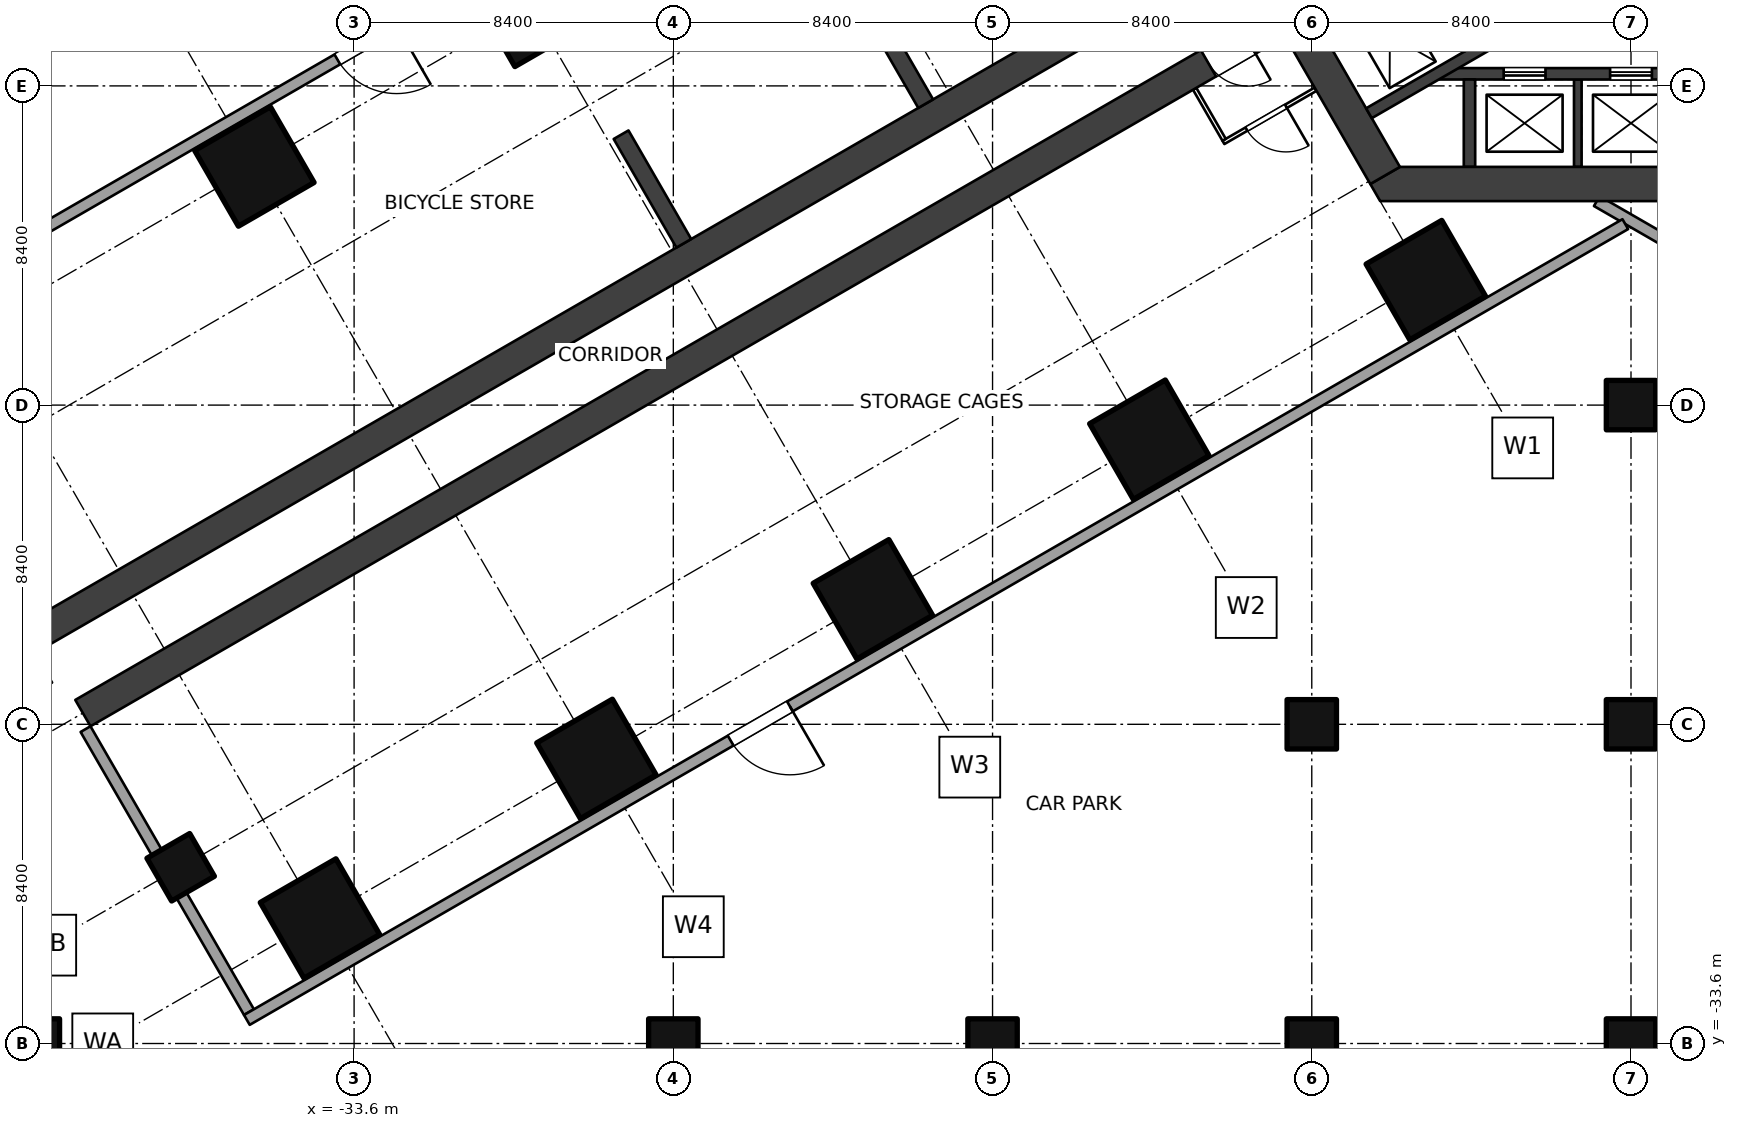
"""IFC4 building model, lengths in metres.
Left out: names, types, materials, properties, quantities, classifications, styles, units other than length and angle.
Written with IfcOpenShell. Run it as: python <this file> out.ifc"""

import sys

from ifc_helpers import new_model, si_unit, direction, frame, frame_2d, origin, origin_2d, place, context, subcontext, project, spatial, polyline, rectangle, outline, extrude, element, fill, save


model = new_model("IFC4")
c1 = context("Model", 3, precision=1e-05, world=origin(), true_north=direction((0.0, 1.0)))
c2 = subcontext(c1, "Body", "Model", "MODEL_VIEW")
j1 = project(units=[si_unit("LENGTHUNIT", "METRE"), si_unit("PLANEANGLEUNIT", "RADIAN")], contexts=[c1])
p1 = place(None, origin())
s1 = spatial("IfcSite", under=j1, at=p1, CompositionType="ELEMENT")
p2 = place(p1, origin())
s2 = spatial("IfcBuilding", under=s1, at=p2, CompositionType="ELEMENT")
p3 = place(p2, frame((0.0, 0.0, -7.0)))
s3 = spatial("IfcBuildingStorey", under=s2, at=p3, CompositionType="ELEMENT", Elevation=-7.0)
for number, where, z_axis, x_axis in (
    (1, (-5.4, -13.51, 0.0), (0.0, 0.0, 1.0), (-0.5, 0.866, 0.0)),
    (2, (-12.675, -17.71, 0.0), (0.0, 0.0, 1.0), (-0.5, 0.866, 0.0)),
    (3, (-19.949, -21.91, 0.0), (0.0, 0.0, 1.0), (-0.5, 0.866, 0.0)),
    (4, (-28.949, -6.322, 0.0), (0.0, 0.0, 1.0), (-0.5, 0.866, 0.0)),
    (5, (-27.224, -26.11, 0.0), (0.0, 0.0, 1.0), (-0.5, 0.866, 0.0)),
    (6, (-36.224, -10.521, 0.0), (0.0, 0.0, 1.0), (-0.5, 0.866, 0.0)),
    (7, (-34.499, -30.31, 0.0), (0.0, 0.0, 1.0), (-0.5, 0.866, 0.0)),
):
    element("IfcColumn", number, at=place(p3, frame(where, z_axis=z_axis, x_axis=x_axis)), inside=s3, PredefinedType="COLUMN", context=c2, shape_type="SweptSolid", body=[
        extrude(rectangle(XDim=2.3, YDim=2.3, at=origin_2d()), origin(), (0.0, 0.0, 1.0), 3.5),
    ])
for number, where, z_axis, x_axis in (
    (8, (-38.164, -28.962, 0.0), (0.0, 0.0, 1.0), (-0.5, 0.866, 0.0)),
    (9, (-42.0, -33.6, 0.0), (0.0, 0.0, 1.0), (1.0, 0.0, 0.0)),
    (10, (-25.2, -33.6, 0.0), (0.0, 0.0, 1.0), (1.0, 0.0, 0.0)),
    (11, (-16.8, -33.6, 0.0), (0.0, 0.0, 1.0), (1.0, 0.0, 0.0)),
    (12, (-8.4, -33.6, 0.0), (0.0, 0.0, 1.0), (1.0, 0.0, 0.0)),
    (13, (-8.4, -25.2, 0.0), (0.0, 0.0, 1.0), (1.0, 0.0, 0.0)),
    (14, (0.0, -33.6, 0.0), (0.0, 0.0, 1.0), (1.0, 0.0, 0.0)),
    (15, (0.0, -25.2, 0.0), (0.0, 0.0, 1.0), (1.0, 0.0, 0.0)),
    (16, (0.0, -16.8, 0.0), (0.0, 0.0, 1.0), (1.0, 0.0, 0.0)),
):
    element("IfcColumn", number, at=place(p3, frame(where, z_axis=z_axis, x_axis=x_axis)), inside=s3, PredefinedType="COLUMN", context=c2, shape_type="SweptSolid", body=[
        extrude(rectangle(XDim=1.3, YDim=1.3, at=origin_2d()), origin(), (0.0, 0.0, 1.0), 3.5),
    ])
p4 = place(p3, frame((-6.47, -10.757, 0.0), z_axis=(0.0, 0.0, 1.0), x_axis=(-0.499997612506, 0.8660267822, 0.0)))
e17 = element("IfcWall", 17, at=p4, inside=s3, PredefinedType="SHEAR", context=c2, shape_type="SweptSolid", body=[
    extrude(rectangle(XDim=12.161, YDim=0.9, at=frame_2d((6.08, 0.0))), origin(), (0.0, 0.0, 1.0), 3.5),
])
p5 = place(p4, frame((5.33, 0.0, 0.0)))
e18 = element("IfcOpeningElement", 18, at=p5, cuts=e17, PredefinedType="OPENING", context=c2, shape_type="SweptSolid", body=[
    extrude(rectangle(XDim=1.5, YDim=2.1, at=frame_2d((0.75, 1.05))), frame((0.0, 0.46, 0.0), z_axis=(0.0, -1.0, 0.0), x_axis=(1.0, 0.0, 0.0)), (0.0, 0.0, 1.0), 0.92),
])
p6 = place(p3, origin())
e19 = element("IfcWall", 19, at=p6, inside=s3, PredefinedType="SHEAR", context=c2, shape_type="SweptSolid", body=[
    extrude(outline(polyline([(-6.6, -11.432), (6.6, -11.432), (6.86, -10.981), (6.08, -10.531), (-6.08, -10.531), (-6.86, -10.981), (-6.6, -11.432)])), origin(), (0.0, 0.0, 1.0), 3.5),
])
p7 = place(p3, frame((-0.919, -5.669, 0.0), z_axis=(0.0, 0.0, 1.0), x_axis=(-0.866011800373, -0.500023561059, 0.0)))
e20 = element("IfcWall", 20, at=p7, inside=s3, PredefinedType="SHEAR", context=c2, shape_type="SweptSolid", body=[
    extrude(rectangle(XDim=6.902, YDim=0.3, at=frame_2d((3.451, 0.0))), origin(), (0.0, 0.0, 1.0), 3.5),
])
p8 = place(p3, frame((5.098, -8.082, 0.0), z_axis=(0.0, 0.0, 1.0), x_axis=(-1.0, 0.0, 0.0)))
e21 = element("IfcWall", 21, at=p8, inside=s3, PredefinedType="SHEAR", context=c2, shape_type="SweptSolid", body=[
    extrude(rectangle(XDim=10.195, YDim=0.3, at=frame_2d((5.098, 0.0))), origin(), (0.0, 0.0, 1.0), 3.5),
])
p9 = place(p8, frame((1.748, 0.0, 0.0)))
e22 = element("IfcOpeningElement", 22, at=p9, cuts=e21, PredefinedType="OPENING", context=c2, shape_type="SweptSolid", body=[
    extrude(rectangle(XDim=1.1, YDim=2.1, at=frame_2d((0.55, 1.05))), frame((0.0, 0.16, 0.0), z_axis=(0.0, -1.0, 0.0), x_axis=(1.0, 0.0, 0.0)), (0.0, 0.0, 1.0), 0.32),
])
p10 = place(p8, frame((4.548, 0.0, 0.0)))
e23 = element("IfcOpeningElement", 23, at=p10, cuts=e21, PredefinedType="OPENING", context=c2, shape_type="SweptSolid", body=[
    extrude(rectangle(XDim=1.1, YDim=2.1, at=frame_2d((0.55, 1.05))), frame((0.0, 0.16, 0.0), z_axis=(0.0, -1.0, 0.0), x_axis=(1.0, 0.0, 0.0)), (0.0, 0.0, 1.0), 0.32),
])
p11 = place(p8, frame((7.348, 0.0, 0.0)))
e24 = element("IfcOpeningElement", 24, at=p11, cuts=e21, PredefinedType="OPENING", context=c2, shape_type="SweptSolid", body=[
    extrude(rectangle(XDim=1.1, YDim=2.1, at=frame_2d((0.55, 1.05))), frame((0.0, 0.16, 0.0), z_axis=(0.0, -1.0, 0.0), x_axis=(1.0, 0.0, 0.0)), (0.0, 0.0, 1.0), 0.32),
])
p12 = place(p3, frame((-4.25, -8.231, 0.0), z_axis=(0.0, 0.0, 1.0), x_axis=(0.0, -1.0, 0.0)))
e25 = element("IfcWall", 25, at=p12, inside=s3, PredefinedType="SHEAR", context=c2, shape_type="SweptSolid", body=[
    extrude(rectangle(XDim=2.3, YDim=0.3, at=frame_2d((1.15, 0.0))), origin(), (0.0, 0.0, 1.0), 3.5),
])
p13 = place(p3, frame((-1.4, -8.231, 0.0), z_axis=(0.0, 0.0, 1.0), x_axis=(0.0, -1.0, 0.0)))
e26 = element("IfcWall", 26, at=p13, inside=s3, PredefinedType="SHEAR", context=c2, shape_type="SweptSolid", body=[
    extrude(rectangle(XDim=2.3, YDim=0.2, at=frame_2d((1.15, 0.0))), origin(), (0.0, 0.0, 1.0), 3.5),
])
p14 = place(p3, frame((-8.91, -6.53, 0.0), z_axis=(0.0, 0.0, 1.0), x_axis=(-0.866025284237, -0.500000207062, 0.0)))
e27 = element("IfcWall", 27, at=p14, inside=s3, PredefinedType="SHEAR", context=c2, shape_type="SweptSolid", body=[
    extrude(rectangle(XDim=36.75, YDim=0.8, at=frame_2d((18.375, 0.0))), origin(), (0.0, 0.0, 1.0), 3.5),
])
p15 = place(p14, frame((1.35, 0.0, 0.0)))
e28 = element("IfcOpeningElement", 28, at=p15, cuts=e27, PredefinedType="OPENING", context=c2, shape_type="SweptSolid", body=[
    extrude(rectangle(XDim=1.2, YDim=2.1, at=frame_2d((0.6, 1.05))), frame((0.0, 0.41, 0.0), z_axis=(0.0, -1.0, 0.0), x_axis=(1.0, 0.0, 0.0)), (0.0, 0.0, 1.0), 0.82),
])
p16 = place(p3, frame((-10.11, -4.451, 0.0), z_axis=(0.0, 0.0, 1.0), x_axis=(-0.866025284237, -0.500000207062, 0.0)))
e29 = element("IfcWall", 29, at=p16, inside=s3, PredefinedType="SHEAR", context=c2, shape_type="SweptSolid", body=[
    extrude(rectangle(XDim=36.75, YDim=0.8, at=frame_2d((18.375, 0.0))), origin(), (0.0, 0.0, 1.0), 3.5),
])
p17 = place(p16, frame((1.35, 0.0, 0.0)))
e30 = element("IfcOpeningElement", 30, at=p17, cuts=e29, PredefinedType="OPENING", context=c2, shape_type="SweptSolid", body=[
    extrude(rectangle(XDim=1.2, YDim=2.1, at=frame_2d((0.6, 1.05))), frame((0.0, 0.41, 0.0), z_axis=(0.0, -1.0, 0.0), x_axis=(1.0, 0.0, 0.0)), (0.0, 0.0, 1.0), 0.82),
])
p18 = place(p3, frame((-8.3, -8.487, 0.0), z_axis=(0.0, 0.0, 1.0), x_axis=(-0.866034573852, -0.49998411664, 0.0)))
e31 = element("IfcWall", 31, at=p18, inside=s3, PredefinedType="PARTITIONING", context=c2, shape_type="SweptSolid", body=[
    extrude(rectangle(XDim=2.8, YDim=0.1, at=frame_2d((1.4, 0.0))), origin(), (0.0, 0.0, 1.0), 3.2),
])
p19 = place(p18, frame((0.9, 0.0, 0.0)))
e32 = element("IfcOpeningElement", 32, at=p19, cuts=e31, PredefinedType="OPENING", context=c2, shape_type="SweptSolid", body=[
    extrude(rectangle(XDim=1.2, YDim=2.1, at=frame_2d((0.6, 1.05))), frame((0.0, 0.06, 0.0), z_axis=(0.0, -1.0, 0.0), x_axis=(1.0, 0.0, 0.0)), (0.0, 0.0, 1.0), 0.12),
])
p20 = place(p3, frame((-11.482, -8.476, 0.0), z_axis=(0.0, 0.0, 1.0), x_axis=(0.500017819788, -0.86601511528, 0.0)))
e33 = element("IfcWall", 33, at=p20, inside=s3, PredefinedType="PARTITIONING", context=c2, shape_type="SweptSolid", body=[
    extrude(rectangle(XDim=1.55, YDim=0.1, at=frame_2d((0.775, 0.0))), origin(), (0.0, 0.0, 1.0), 3.2),
])
p21 = place(p3, frame((-40.667, -25.326, 0.0), z_axis=(0.0, 0.0, 1.0), x_axis=(0.500007509209, -0.866021068297, 0.0)))
e34 = element("IfcWall", 34, at=p21, inside=s3, PredefinedType="SOLIDWALL", context=c2, shape_type="SweptSolid", body=[
    extrude(rectangle(XDim=8.6, YDim=0.3, at=frame_2d((4.3, 0.0))), origin(), (0.0, 0.0, 1.0), 1.9),
])
p22 = place(p3, frame((-0.15, -12.038, 0.0), z_axis=(0.0, 0.0, 1.0), x_axis=(-0.866026292622, -0.499998460486, 0.0)))
e35 = element("IfcWall", 35, at=p22, inside=s3, PredefinedType="SOLIDWALL", context=c2, shape_type="SweptSolid", body=[
    extrude(rectangle(XDim=41.883, YDim=0.3, at=frame_2d((20.941, 0.0))), origin(), (0.0, 0.0, 1.0), 3.2),
])
p23 = place(p22, frame((25.383, 0.0, 0.0)))
e36 = element("IfcOpeningElement", 36, at=p23, cuts=e35, PredefinedType="OPENING", context=c2, shape_type="SweptSolid", body=[
    extrude(rectangle(XDim=1.8, YDim=2.4, at=frame_2d((0.9, 1.2))), frame((0.0, 0.16, 0.0), z_axis=(0.0, -1.0, 0.0), x_axis=(1.0, 0.0, 0.0)), (0.0, 0.0, 1.0), 0.32),
])
p24 = place(p3, frame((-9.45, 6.495, 0.0), z_axis=(0.0, 0.0, 1.0), x_axis=(-0.866025301493, -0.500000177174, 0.0)))
e37 = element("IfcWall", 37, at=p24, inside=s3, PredefinedType="SOLIDWALL", context=c2, shape_type="SweptSolid", body=[
    extrude(rectangle(XDim=43.095, YDim=0.3, at=frame_2d((21.548, 0.0))), origin(), (0.0, 0.0, 1.0), 3.2),
])
p25 = place(p24, frame((26.595, 0.0, 0.0)))
e38 = element("IfcOpeningElement", 38, at=p25, cuts=e37, PredefinedType="OPENING", context=c2, shape_type="SweptSolid", body=[
    extrude(rectangle(XDim=1.8, YDim=2.4, at=frame_2d((0.9, 1.2))), frame((0.0, 0.16, 0.0), z_axis=(0.0, -1.0, 0.0), x_axis=(1.0, 0.0, 0.0)), (0.0, 0.0, 1.0), 0.32),
])
p26 = place(p3, frame((-0.9, -11.432, 0.0), z_axis=(0.0, 0.0, 1.0), x_axis=(0.866025301493, -0.500000177174, 0.0)))
e39 = element("IfcWall", 39, at=p26, inside=s3, PredefinedType="SOLIDWALL", context=c2, shape_type="SweptSolid", body=[
    extrude(rectangle(XDim=43.095, YDim=0.3, at=frame_2d((21.548, 0.0))), origin(), (0.0, 0.0, 1.0), 3.2),
])
p27 = place(p26, frame((26.595, 0.0, 0.0)))
e40 = element("IfcOpeningElement", 40, at=p27, cuts=e39, PredefinedType="OPENING", context=c2, shape_type="SweptSolid", body=[
    extrude(rectangle(XDim=1.8, YDim=2.4, at=frame_2d((0.9, 1.2))), frame((0.0, 0.16, 0.0), z_axis=(0.0, -1.0, 0.0), x_axis=(1.0, 0.0, 0.0)), (0.0, 0.0, 1.0), 0.32),
])
for number, where, z_axis, x_axis in (
    (41, (-18.559, -8.868, 0.0), (0.0, 0.0, 1.0), (-0.5, 0.866, 0.0)),
    (42, (-24.925, -12.543, 0.0), (0.0, 0.0, 1.0), (-0.5, 0.866, 0.0)),
):
    element("IfcWall", number, at=place(p3, frame(where, z_axis=z_axis, x_axis=x_axis)), inside=s3, PredefinedType="SOLIDWALL", context=c2, shape_type="SweptSolid", body=[
        extrude(rectangle(XDim=3.3, YDim=0.45, at=frame_2d((1.65, 0.0))), origin(), (0.0, 0.0, 1.0), 3.5),
    ])
p28 = place(p10, origin())
e43 = element("IfcDoor", 43, at=p28, inside=s3, OperationType="DOUBLE_DOOR_SLIDING", PredefinedType="DOOR", context=c2, shape_type="SweptSolid", body=[
    extrude(rectangle(XDim=1.1, YDim=2.1, at=frame_2d((0.55, 1.05))), frame((0.0, 0.025, 0.0), z_axis=(0.0, -1.0, 0.0), x_axis=(1.0, 0.0, 0.0)), (0.0, 0.0, 1.0), 0.05),
])
fill(e23, e43)
p29 = place(p11, origin())
e44 = element("IfcDoor", 44, at=p29, inside=s3, OperationType="DOUBLE_DOOR_SLIDING", PredefinedType="DOOR", context=c2, shape_type="SweptSolid", body=[
    extrude(rectangle(XDim=1.1, YDim=2.1, at=frame_2d((0.55, 1.05))), frame((0.0, 0.025, 0.0), z_axis=(0.0, -1.0, 0.0), x_axis=(1.0, 0.0, 0.0)), (0.0, 0.0, 1.0), 0.05),
])
fill(e24, e44)
p30 = place(p15, origin())
e45 = element("IfcDoor", 45, at=p30, inside=s3, OperationType="DOUBLE_SWING_LEFT", PredefinedType="DOOR", context=c2, shape_type="SweptSolid", body=[
    extrude(rectangle(XDim=1.2, YDim=2.1, at=frame_2d((0.6, 1.05))), frame((0.0, 0.025, 0.0), z_axis=(0.0, -1.0, 0.0), x_axis=(1.0, 0.0, 0.0)), (0.0, 0.0, 1.0), 0.05),
])
fill(e28, e45)
p31 = place(p19, origin())
e46 = element("IfcDoor", 46, at=p31, inside=s3, OperationType="DOUBLE_SWING_LEFT", PredefinedType="DOOR", context=c2, shape_type="SweptSolid", body=[
    extrude(rectangle(XDim=1.2, YDim=2.1, at=frame_2d((0.6, 1.05))), frame((0.0, 0.025, 0.0), z_axis=(0.0, -1.0, 0.0), x_axis=(1.0, 0.0, 0.0)), (0.0, 0.0, 1.0), 0.05),
])
fill(e32, e46)
p32 = place(p23, origin())
e47 = element("IfcDoor", 47, at=p32, inside=s3, OperationType="DOUBLE_DOOR_DOUBLE_SWING", PredefinedType="DOOR", context=c2, shape_type="SweptSolid", body=[
    extrude(rectangle(XDim=1.8, YDim=2.4, at=frame_2d((0.9, 1.2))), frame((0.0, 0.025, 0.0), z_axis=(0.0, -1.0, 0.0), x_axis=(1.0, 0.0, 0.0)), (0.0, 0.0, 1.0), 0.05),
])
fill(e36, e47)
p33 = place(p25, origin())
e48 = element("IfcDoor", 48, at=p33, inside=s3, OperationType="DOUBLE_DOOR_DOUBLE_SWING", PredefinedType="DOOR", context=c2, shape_type="SweptSolid", body=[
    extrude(rectangle(XDim=1.8, YDim=2.4, at=frame_2d((0.9, 1.2))), frame((0.0, 0.025, 0.0), z_axis=(0.0, -1.0, 0.0), x_axis=(1.0, 0.0, 0.0)), (0.0, 0.0, 1.0), 0.05),
])
fill(e38, e48)
save(model, sys.argv[1])
